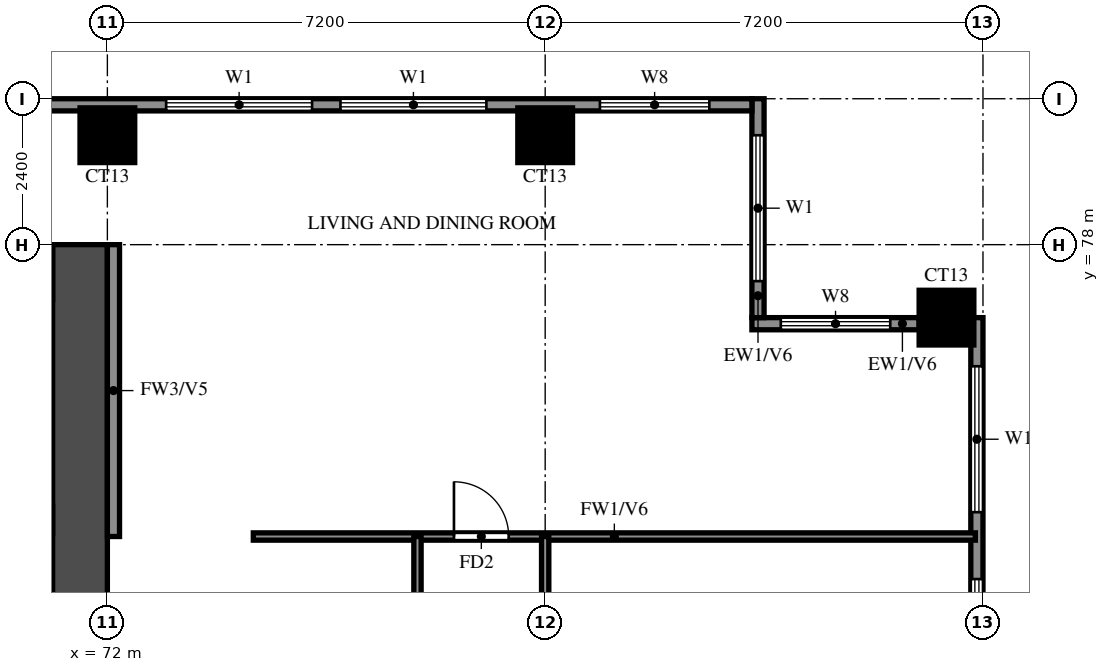
"""IFC4 building model, lengths in metres.
Left out: names, types, materials, properties, quantities, classifications, styles, units other than length and angle.
Written with IfcOpenShell. Run it as: python <this file> out.ifc"""

import sys

from ifc_helpers import new_model, si_unit, direction, frame, frame_2d, origin, origin_2d, place, context, subcontext, project, spatial, rectangle, extrude, source, transform, mapped, element, fill, save


model = new_model("IFC4")
c1 = context("Model", 3, precision=1e-05, world=origin(), true_north=direction((0.0, 1.0)))
c2 = subcontext(c1, "Body", "Model", "MODEL_VIEW")
j1 = project(units=[si_unit("LENGTHUNIT", "METRE"), si_unit("PLANEANGLEUNIT", "RADIAN")], contexts=[c1])
p1 = place(None, origin())
s1 = spatial("IfcSite", under=j1, at=p1, CompositionType="ELEMENT")
p2 = place(p1, origin())
s2 = spatial("IfcBuilding", under=s1, at=p2, CompositionType="ELEMENT")
p3 = place(p2, frame((0.0, 0.0, 104.0)))
s3 = spatial("IfcBuildingStorey", under=s2, at=p3, CompositionType="ELEMENT", Elevation=104.0)
m1 = source(origin(), c2, "Body", "SweptSolid", [
    extrude(rectangle(XDim=0.9, YDim=0.9, at=origin_2d()), origin(), (0.0, 0.0, 1.0), 3.1),
])
for number, where, z_axis, x_axis in (
    (1, (85.8, 76.8, 0.0), (0.0, 0.0, 1.0), (1.0, 0.0, 0.0)),
    (2, (72.0, 79.8, 0.0), (0.0, 0.0, 1.0), (1.0, 0.0, 0.0)),
    (3, (79.2, 79.8, 0.0), (0.0, 0.0, 1.0), (1.0, 0.0, 0.0)),
):
    element("IfcColumn", number, at=place(p3, frame(where, z_axis=z_axis, x_axis=x_axis)), inside=s3, PredefinedType="COLUMN", context=c2, shape_type="MappedRepresentation", body=[
        mapped(m1, transform((0.0, 0.0, 0.0))),
    ])
p4 = place(p3, frame((71.55, 66.0, 0.0), z_axis=(0.0, 0.0, 1.0), x_axis=(0.0, 1.0, 0.0)))
e4 = element("IfcWall", 4, at=p4, inside=s3, PredefinedType="SHEAR", context=c2, shape_type="SweptSolid", body=[
    extrude(rectangle(XDim=12.0, YDim=0.9, at=frame_2d((6.0, 0.0))), origin(), (0.0, 0.0, 1.0), 3.1),
])
p5 = place(p3, frame((29.7, 77.55, 0.0), z_axis=(0.0, 0.0, 1.0), x_axis=(1.0, 0.0, 0.0)))
e5 = element("IfcWall", 5, at=p5, inside=s3, PredefinedType="SHEAR", context=c2, shape_type="SweptSolid", body=[
    extrude(rectangle(XDim=41.4, YDim=0.9, at=frame_2d((20.7, 0.0))), origin(), (0.0, 0.0, 1.0), 3.1),
])
p6 = place(p3, frame((86.3, 48.2, 0.0), z_axis=(0.0, 0.0, 1.0), x_axis=(0.0, 1.0, 0.0)))
e6 = element("IfcWall", 6, at=p6, inside=s3, PredefinedType="SOLIDWALL", context=c2, shape_type="SweptSolid", body=[
    extrude(rectangle(XDim=28.6, YDim=0.2, at=frame_2d((14.3, 0.0))), origin(), (0.0, 0.0, 1.0), 3.1),
])
p7 = place(p6, frame((11.5, 0.0, 0.0)))
e7 = element("IfcOpeningElement", 7, at=p7, cuts=e6, PredefinedType="OPENING", context=c2, shape_type="SweptSolid", body=[
    extrude(rectangle(XDim=1.8, YDim=2.4, at=frame_2d((0.9, 1.2))), frame((0.0, 0.11, 0.0), z_axis=(0.0, -1.0, 0.0), x_axis=(1.0, 0.0, 0.0)), (0.0, 0.0, 1.0), 0.22),
])
p8 = place(p6, frame((0.6, 0.0, 0.6)))
e8 = element("IfcOpeningElement", 8, at=p8, cuts=e6, PredefinedType="OPENING", context=c2, shape_type="SweptSolid", body=[
    extrude(rectangle(XDim=2.4, YDim=2.4, at=frame_2d((1.2, 1.2))), frame((0.0, 0.11, 0.0), z_axis=(0.0, -1.0, 0.0), x_axis=(1.0, 0.0, 0.0)), (0.0, 0.0, 1.0), 0.22),
])
p9 = place(p6, frame((3.8, 0.0, 0.6)))
e9 = element("IfcOpeningElement", 9, at=p9, cuts=e6, PredefinedType="OPENING", context=c2, shape_type="SweptSolid", body=[
    extrude(rectangle(XDim=2.4, YDim=2.4, at=frame_2d((1.2, 1.2))), frame((0.0, 0.11, 0.0), z_axis=(0.0, -1.0, 0.0), x_axis=(1.0, 0.0, 0.0)), (0.0, 0.0, 1.0), 0.22),
])
p10 = place(p6, frame((7.8, 0.0, 0.6)))
e10 = element("IfcOpeningElement", 10, at=p10, cuts=e6, PredefinedType="OPENING", context=c2, shape_type="SweptSolid", body=[
    extrude(rectangle(XDim=1.2, YDim=2.4, at=frame_2d((0.6, 1.2))), frame((0.0, 0.11, 0.0), z_axis=(0.0, -1.0, 0.0), x_axis=(1.0, 0.0, 0.0)), (0.0, 0.0, 1.0), 0.22),
])
p11 = place(p6, frame((14.85, 0.0, 0.6)))
e11 = element("IfcOpeningElement", 11, at=p11, cuts=e6, PredefinedType="OPENING", context=c2, shape_type="SweptSolid", body=[
    extrude(rectangle(XDim=0.9, YDim=2.4, at=frame_2d((0.45, 1.2))), frame((0.0, 0.11, 0.0), z_axis=(0.0, -1.0, 0.0), x_axis=(1.0, 0.0, 0.0)), (0.0, 0.0, 1.0), 0.22),
])
p12 = place(p6, frame((16.75, 0.0, 0.6)))
e12 = element("IfcOpeningElement", 12, at=p12, cuts=e6, PredefinedType="OPENING", context=c2, shape_type="SweptSolid", body=[
    extrude(rectangle(XDim=0.9, YDim=2.4, at=frame_2d((0.45, 1.2))), frame((0.0, 0.11, 0.0), z_axis=(0.0, -1.0, 0.0), x_axis=(1.0, 0.0, 0.0)), (0.0, 0.0, 1.0), 0.22),
])
p13 = place(p6, frame((18.95, 0.0, 1.5)))
e13 = element("IfcOpeningElement", 13, at=p13, cuts=e6, PredefinedType="OPENING", context=c2, shape_type="SweptSolid", body=[
    extrude(rectangle(XDim=0.9, YDim=0.9, at=frame_2d((0.45, 0.45))), frame((0.0, 0.11, 0.0), z_axis=(0.0, -1.0, 0.0), x_axis=(1.0, 0.0, 0.0)), (0.0, 0.0, 1.0), 0.22),
])
p14 = place(p6, frame((22.5, 0.0, 0.6)))
e14 = element("IfcOpeningElement", 14, at=p14, cuts=e6, PredefinedType="OPENING", context=c2, shape_type="SweptSolid", body=[
    extrude(rectangle(XDim=1.8, YDim=2.4, at=frame_2d((0.9, 1.2))), frame((0.0, 0.11, 0.0), z_axis=(0.0, -1.0, 0.0), x_axis=(1.0, 0.0, 0.0)), (0.0, 0.0, 1.0), 0.22),
])
p15 = place(p6, frame((25.4, 0.0, 0.6)))
e15 = element("IfcOpeningElement", 15, at=p15, cuts=e6, PredefinedType="OPENING", context=c2, shape_type="SweptSolid", body=[
    extrude(rectangle(XDim=2.4, YDim=2.4, at=frame_2d((1.2, 1.2))), frame((0.0, 0.11, 0.0), z_axis=(0.0, -1.0, 0.0), x_axis=(1.0, 0.0, 0.0)), (0.0, 0.0, 1.0), 0.22),
])
p16 = place(p3, frame((85.35, 76.7, 0.0), z_axis=(0.0, 0.0, 1.0), x_axis=(-1.0, 0.0, 0.0)))
e16 = element("IfcWall", 16, at=p16, inside=s3, PredefinedType="SOLIDWALL", context=c2, shape_type="SweptSolid", body=[
    extrude(rectangle(XDim=2.75, YDim=0.2, at=frame_2d((1.375, 0.0))), origin(), (0.0, 0.0, 1.0), 3.1),
])
p17 = place(p16, frame((0.475, 0.0, 0.6)))
e17 = element("IfcOpeningElement", 17, at=p17, cuts=e16, PredefinedType="OPENING", context=c2, shape_type="SweptSolid", body=[
    extrude(rectangle(XDim=1.8, YDim=2.4, at=frame_2d((0.9, 1.2))), frame((0.0, 0.11, 0.0), z_axis=(0.0, -1.0, 0.0), x_axis=(1.0, 0.0, 0.0)), (0.0, 0.0, 1.0), 0.22),
])
p18 = place(p3, frame((82.7, 76.8, 0.0), z_axis=(0.0, 0.0, 1.0), x_axis=(0.0, 1.0, 0.0)))
e18 = element("IfcWall", 18, at=p18, inside=s3, PredefinedType="SOLIDWALL", context=c2, shape_type="SweptSolid", body=[
    extrude(rectangle(XDim=3.6, YDim=0.2, at=frame_2d((1.8, 0.0))), origin(), (0.0, 0.0, 1.0), 3.1),
])
p19 = place(p18, frame((0.6, 0.0, 0.6)))
e19 = element("IfcOpeningElement", 19, at=p19, cuts=e18, PredefinedType="OPENING", context=c2, shape_type="SweptSolid", body=[
    extrude(rectangle(XDim=2.4, YDim=2.4, at=frame_2d((1.2, 1.2))), frame((0.0, 0.11, 0.0), z_axis=(0.0, -1.0, 0.0), x_axis=(1.0, 0.0, 0.0)), (0.0, 0.0, 1.0), 0.22),
])
p20 = place(p3, frame((82.6, 80.3, 0.0), z_axis=(0.0, 0.0, 1.0), x_axis=(-1.0, 0.0, 0.0)))
e20 = element("IfcWall", 20, at=p20, inside=s3, PredefinedType="SOLIDWALL", context=c2, shape_type="SweptSolid", body=[
    extrude(rectangle(XDim=53.8, YDim=0.2, at=frame_2d((26.9, 0.0))), origin(), (0.0, 0.0, 1.0), 3.1),
])
p21 = place(p20, frame((0.7, 0.0, 0.6)))
e21 = element("IfcOpeningElement", 21, at=p21, cuts=e20, PredefinedType="OPENING", context=c2, shape_type="SweptSolid", body=[
    extrude(rectangle(XDim=1.8, YDim=2.4, at=frame_2d((0.9, 1.2))), frame((0.0, 0.11, 0.0), z_axis=(0.0, -1.0, 0.0), x_axis=(1.0, 0.0, 0.0)), (0.0, 0.0, 1.0), 0.22),
])
p22 = place(p20, frame((4.367, 0.0, 0.6)))
e22 = element("IfcOpeningElement", 22, at=p22, cuts=e20, PredefinedType="OPENING", context=c2, shape_type="SweptSolid", body=[
    extrude(rectangle(XDim=2.4, YDim=2.4, at=frame_2d((1.2, 1.2))), frame((0.0, 0.11, 0.0), z_axis=(0.0, -1.0, 0.0), x_axis=(1.0, 0.0, 0.0)), (0.0, 0.0, 1.0), 0.22),
])
p23 = place(p20, frame((7.233, 0.0, 0.6)))
e23 = element("IfcOpeningElement", 23, at=p23, cuts=e20, PredefinedType="OPENING", context=c2, shape_type="SweptSolid", body=[
    extrude(rectangle(XDim=2.4, YDim=2.4, at=frame_2d((1.2, 1.2))), frame((0.0, 0.11, 0.0), z_axis=(0.0, -1.0, 0.0), x_axis=(1.0, 0.0, 0.0)), (0.0, 0.0, 1.0), 0.22),
])
p24 = place(p3, frame((72.1, 73.2, 0.0), z_axis=(0.0, 0.0, 1.0), x_axis=(0.0, 1.0, 0.0)))
e24 = element("IfcWall", 24, at=p24, inside=s3, PredefinedType="SOLIDWALL", context=c2, shape_type="SweptSolid", body=[
    extrude(rectangle(XDim=4.8, YDim=0.2, at=frame_2d((2.4, 0.0))), origin(), (0.0, 0.0, 1.0), 3.1),
])
p25 = place(p3, frame((74.4, 73.2, 0.0), z_axis=(0.0, 0.0, 1.0), x_axis=(1.0, 0.0, 0.0)))
e25 = element("IfcWall", 25, at=p25, inside=s3, PredefinedType="PARTITIONING", context=c2, shape_type="SweptSolid", body=[
    extrude(rectangle(XDim=11.875, YDim=0.12, at=frame_2d((5.938, 0.0))), origin(), (0.0, 0.0, 1.0), 3.1),
])
p26 = place(p25, frame((3.3, 0.0, 0.0)))
e26 = element("IfcOpeningElement", 26, at=p26, cuts=e25, PredefinedType="OPENING", context=c2, shape_type="SweptSolid", body=[
    extrude(rectangle(XDim=0.9, YDim=2.1, at=frame_2d((0.45, 1.05))), frame((0.0, 0.07, 0.0), z_axis=(0.0, -1.0, 0.0), x_axis=(1.0, 0.0, 0.0)), (0.0, 0.0, 1.0), 0.14),
])
p27 = place(p3, frame((77.1, 64.8, 0.0), z_axis=(0.0, 0.0, 1.0), x_axis=(0.0, 1.0, 0.0)))
e27 = element("IfcWall", 27, at=p27, inside=s3, PredefinedType="PARTITIONING", context=c2, shape_type="SweptSolid", body=[
    extrude(rectangle(XDim=8.4, YDim=0.12, at=frame_2d((4.2, 0.0))), origin(), (0.0, 0.0, 1.0), 3.1),
])
p28 = place(p27, frame((1.875, 0.0, 0.0)))
e28 = element("IfcOpeningElement", 28, at=p28, cuts=e27, PredefinedType="OPENING", context=c2, shape_type="SweptSolid", body=[
    extrude(rectangle(XDim=0.9, YDim=2.1, at=frame_2d((0.45, 1.05))), frame((0.0, 0.07, 0.0), z_axis=(0.0, -1.0, 0.0), x_axis=(1.0, 0.0, 0.0)), (0.0, 0.0, 1.0), 0.14),
])
p29 = place(p27, frame((6.075, 0.0, 0.0)))
e29 = element("IfcOpeningElement", 29, at=p29, cuts=e27, PredefinedType="OPENING", context=c2, shape_type="SweptSolid", body=[
    extrude(rectangle(XDim=0.9, YDim=2.1, at=frame_2d((0.45, 1.05))), frame((0.0, 0.07, 0.0), z_axis=(0.0, -1.0, 0.0), x_axis=(1.0, 0.0, 0.0)), (0.0, 0.0, 1.0), 0.14),
])
p30 = place(p3, frame((79.2, 69.6, 0.0), z_axis=(0.0, 0.0, 1.0), x_axis=(0.0, 1.0, 0.0)))
e30 = element("IfcWall", 30, at=p30, inside=s3, PredefinedType="PARTITIONING", context=c2, shape_type="SweptSolid", body=[
    extrude(rectangle(XDim=3.6, YDim=0.12, at=frame_2d((1.8, 0.0))), origin(), (0.0, 0.0, 1.0), 3.1),
])
p31 = place(p30, frame((1.35, 0.0, 0.0)))
e31 = element("IfcOpeningElement", 31, at=p31, cuts=e30, PredefinedType="OPENING", context=c2, shape_type="SweptSolid", body=[
    extrude(rectangle(XDim=0.9, YDim=2.1, at=frame_2d((0.45, 1.05))), frame((0.0, 0.07, 0.0), z_axis=(0.0, -1.0, 0.0), x_axis=(1.0, 0.0, 0.0)), (0.0, 0.0, 1.0), 0.14),
])
p32 = place(p14, origin())
e32 = element("IfcWindow", 32, at=p32, inside=s3, PartitioningType="DOUBLE_PANEL_VERTICAL", PredefinedType="WINDOW", context=c2, shape_type="SweptSolid", body=[
    extrude(rectangle(XDim=1.8, YDim=2.4, at=frame_2d((0.9, 1.2))), frame((0.0, 0.03, 0.0), z_axis=(0.0, -1.0, 0.0), x_axis=(1.0, 0.0, 0.0)), (0.0, 0.0, 1.0), 0.06),
])
fill(e14, e32)
p33 = place(p15, origin())
e33 = element("IfcWindow", 33, at=p33, inside=s3, PartitioningType="DOUBLE_PANEL_VERTICAL", PredefinedType="WINDOW", context=c2, shape_type="SweptSolid", body=[
    extrude(rectangle(XDim=2.4, YDim=2.4, at=frame_2d((1.2, 1.2))), frame((0.0, 0.03, 0.0), z_axis=(0.0, -1.0, 0.0), x_axis=(1.0, 0.0, 0.0)), (0.0, 0.0, 1.0), 0.06),
])
fill(e15, e33)
p34 = place(p17, origin())
e34 = element("IfcWindow", 34, at=p34, inside=s3, PartitioningType="DOUBLE_PANEL_VERTICAL", PredefinedType="WINDOW", context=c2, shape_type="SweptSolid", body=[
    extrude(rectangle(XDim=1.8, YDim=2.4, at=frame_2d((0.9, 1.2))), frame((0.0, 0.03, 0.0), z_axis=(0.0, -1.0, 0.0), x_axis=(1.0, 0.0, 0.0)), (0.0, 0.0, 1.0), 0.06),
])
fill(e17, e34)
p35 = place(p19, origin())
e35 = element("IfcWindow", 35, at=p35, inside=s3, PartitioningType="DOUBLE_PANEL_VERTICAL", PredefinedType="WINDOW", context=c2, shape_type="SweptSolid", body=[
    extrude(rectangle(XDim=2.4, YDim=2.4, at=frame_2d((1.2, 1.2))), frame((0.0, 0.03, 0.0), z_axis=(0.0, -1.0, 0.0), x_axis=(1.0, 0.0, 0.0)), (0.0, 0.0, 1.0), 0.06),
])
fill(e19, e35)
p36 = place(p21, origin())
e36 = element("IfcWindow", 36, at=p36, inside=s3, PartitioningType="DOUBLE_PANEL_VERTICAL", PredefinedType="WINDOW", context=c2, shape_type="SweptSolid", body=[
    extrude(rectangle(XDim=1.8, YDim=2.4, at=frame_2d((0.9, 1.2))), frame((0.0, 0.03, 0.0), z_axis=(0.0, -1.0, 0.0), x_axis=(1.0, 0.0, 0.0)), (0.0, 0.0, 1.0), 0.06),
])
fill(e21, e36)
p37 = place(p22, origin())
e37 = element("IfcWindow", 37, at=p37, inside=s3, PartitioningType="DOUBLE_PANEL_VERTICAL", PredefinedType="WINDOW", context=c2, shape_type="SweptSolid", body=[
    extrude(rectangle(XDim=2.4, YDim=2.4, at=frame_2d((1.2, 1.2))), frame((0.0, 0.03, 0.0), z_axis=(0.0, -1.0, 0.0), x_axis=(1.0, 0.0, 0.0)), (0.0, 0.0, 1.0), 0.06),
])
fill(e22, e37)
p38 = place(p23, origin())
e38 = element("IfcWindow", 38, at=p38, inside=s3, PartitioningType="DOUBLE_PANEL_VERTICAL", PredefinedType="WINDOW", context=c2, shape_type="SweptSolid", body=[
    extrude(rectangle(XDim=2.4, YDim=2.4, at=frame_2d((1.2, 1.2))), frame((0.0, 0.03, 0.0), z_axis=(0.0, -1.0, 0.0), x_axis=(1.0, 0.0, 0.0)), (0.0, 0.0, 1.0), 0.06),
])
fill(e23, e38)
p39 = place(p26, origin())
e39 = element("IfcDoor", 39, at=p39, inside=s3, OperationType="SINGLE_SWING_LEFT", PredefinedType="DOOR", context=c2, shape_type="SweptSolid", body=[
    extrude(rectangle(XDim=0.9, YDim=2.1, at=frame_2d((0.45, 1.05))), frame((0.0, 0.025, 0.0), z_axis=(0.0, -1.0, 0.0), x_axis=(1.0, 0.0, 0.0)), (0.0, 0.0, 1.0), 0.05),
])
fill(e26, e39)
save(model, sys.argv[1])
